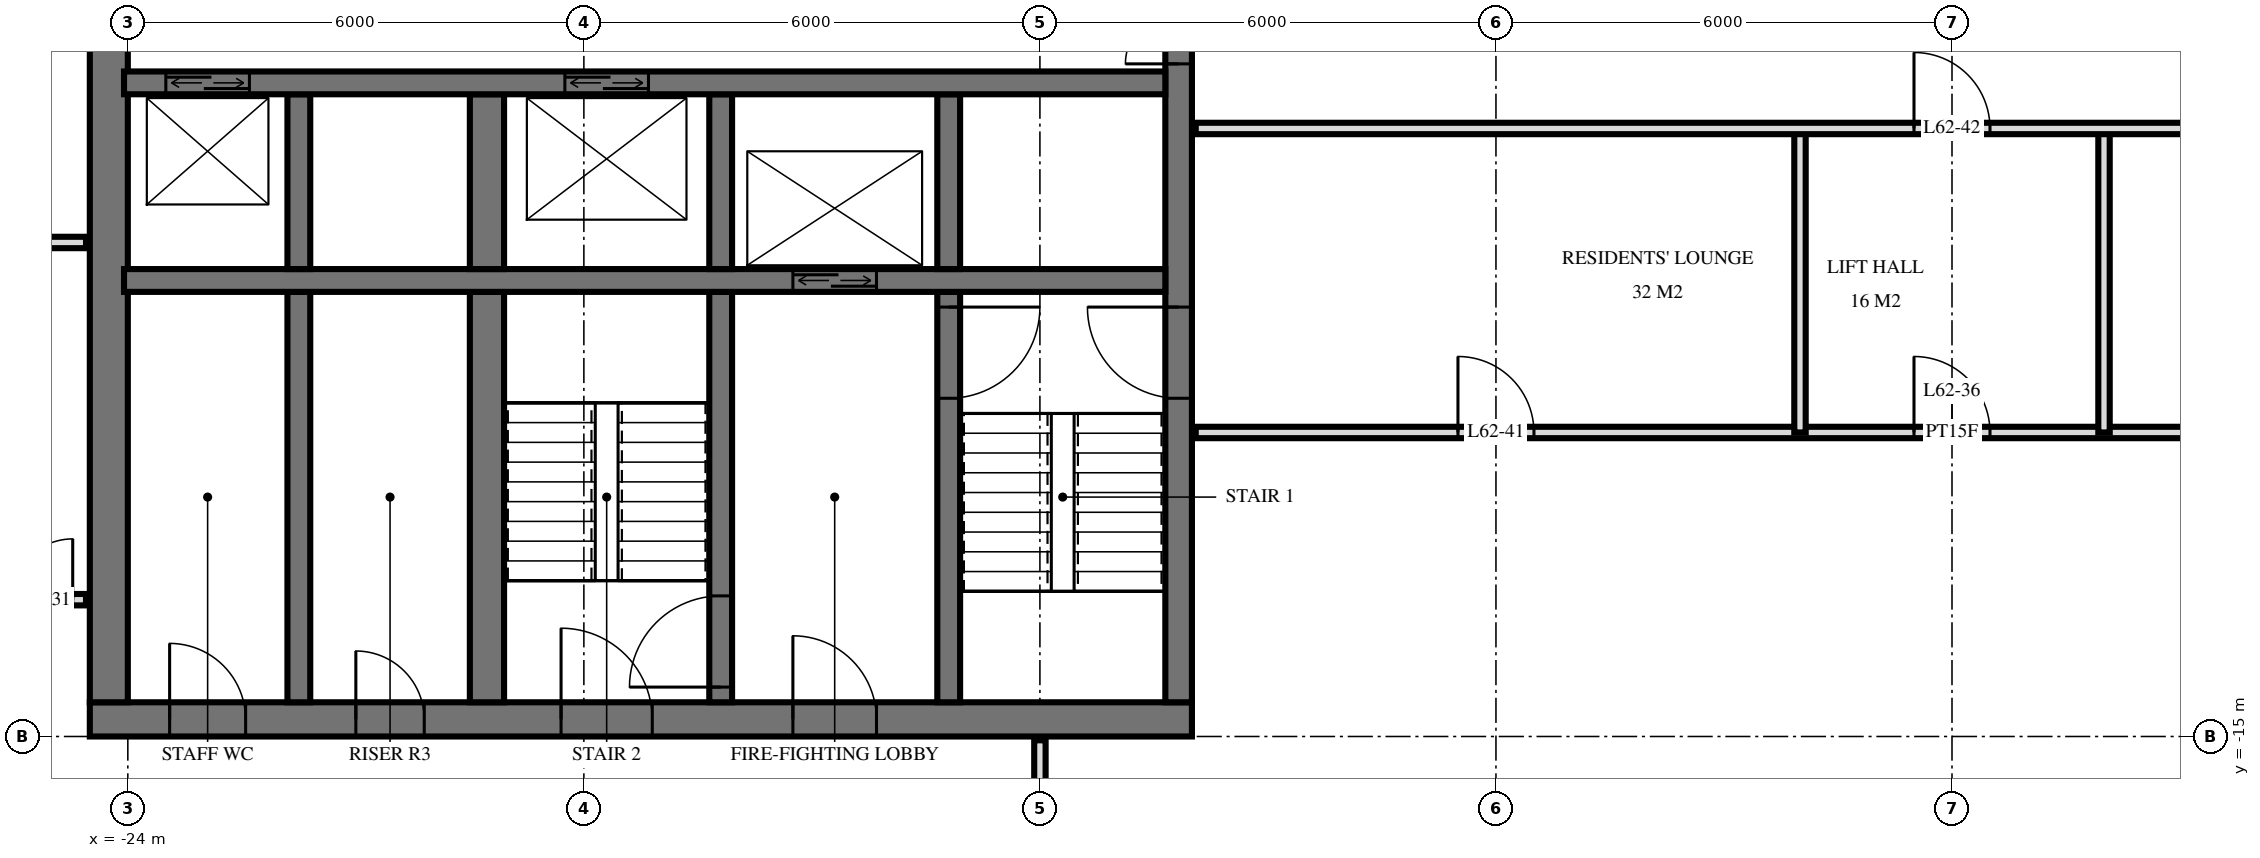
"""IFC4 building model, lengths in metres.
Left out: names, types, materials, properties, quantities, classifications, styles, units other than length and angle.
Written with IfcOpenShell. Run it as: python <this file> out.ifc"""

import sys

from ifc_helpers import new_model, si_unit, direction, frame, frame_2d, origin, place, context, subcontext, project, spatial, rectangle, extrude, element, fill, save


model = new_model("IFC4")
c1 = context("Model", 3, precision=1e-05, world=origin(), true_north=direction((0.0, 1.0)))
c2 = subcontext(c1, "Body", "Model", "MODEL_VIEW")
j1 = project(units=[si_unit("LENGTHUNIT", "METRE"), si_unit("PLANEANGLEUNIT", "RADIAN")], contexts=[c1])
p1 = place(None, origin())
s1 = spatial("IfcSite", under=j1, at=p1, CompositionType="ELEMENT")
p2 = place(p1, origin())
s2 = spatial("IfcBuilding", under=s1, at=p2, CompositionType="ELEMENT")
p3 = place(p2, frame((0.0, 0.0, 236.1)))
s3 = spatial("IfcBuildingStorey", under=s2, at=p3, CompositionType="ELEMENT", Elevation=236.1)
p4 = place(p3, frame((-24.5, -14.775, 0.0), z_axis=(0.0, 0.0, 1.0), x_axis=(1.0, 0.0, 0.0)))
e1 = element("IfcWall", 1, at=p4, inside=s3, PredefinedType="SHEAR", context=c2, shape_type="SweptSolid", body=[
    extrude(rectangle(XDim=14.5, YDim=0.45, at=frame_2d((7.25, 0.0))), origin(), (0.0, 0.0, 1.0), 3.5),
])
p5 = place(p4, frame((6.2, 0.0, 0.0)))
e2 = element("IfcOpeningElement", 2, at=p5, cuts=e1, PredefinedType="OPENING", context=c2, shape_type="SweptSolid", body=[
    extrude(rectangle(XDim=1.2, YDim=2.1, at=frame_2d((0.6, 1.05))), frame((0.0, 0.235, 0.0), z_axis=(0.0, -1.0, 0.0), x_axis=(1.0, 0.0, 0.0)), (0.0, 0.0, 1.0), 0.47),
])
p6 = place(p4, frame((9.25, 0.0, 0.0)))
e3 = element("IfcOpeningElement", 3, at=p6, cuts=e1, PredefinedType="OPENING", context=c2, shape_type="SweptSolid", body=[
    extrude(rectangle(XDim=1.1, YDim=2.1, at=frame_2d((0.55, 1.05))), frame((0.0, 0.235, 0.0), z_axis=(0.0, -1.0, 0.0), x_axis=(1.0, 0.0, 0.0)), (0.0, 0.0, 1.0), 0.47),
])
p7 = place(p4, frame((3.5, 0.0, 0.0)))
e4 = element("IfcOpeningElement", 4, at=p7, cuts=e1, PredefinedType="OPENING", context=c2, shape_type="SweptSolid", body=[
    extrude(rectangle(XDim=0.9, YDim=2.1, at=frame_2d((0.45, 1.05))), frame((0.0, 0.235, 0.0), z_axis=(0.0, -1.0, 0.0), x_axis=(1.0, 0.0, 0.0)), (0.0, 0.0, 1.0), 0.47),
])
p8 = place(p4, frame((1.05, 0.0, 0.0)))
e5 = element("IfcOpeningElement", 5, at=p8, cuts=e1, PredefinedType="OPENING", context=c2, shape_type="SweptSolid", body=[
    extrude(rectangle(XDim=1.0, YDim=2.1, at=frame_2d((0.5, 1.05))), frame((0.0, 0.235, 0.0), z_axis=(0.0, -1.0, 0.0), x_axis=(1.0, 0.0, 0.0)), (0.0, 0.0, 1.0), 0.47),
])
p9 = place(p3, frame((-10.175, -14.55, 0.0), z_axis=(0.0, 0.0, 1.0), x_axis=(0.0, 1.0, 0.0)))
e6 = element("IfcWall", 6, at=p9, inside=s3, PredefinedType="SHEAR", context=c2, shape_type="SweptSolid", body=[
    extrude(rectangle(XDim=14.1, YDim=0.35, at=frame_2d((7.05, 0.0))), origin(), (0.0, 0.0, 1.0), 3.5),
])
p10 = place(p9, frame((8.4, 0.0, 0.0)))
e7 = element("IfcOpeningElement", 7, at=p10, cuts=e6, PredefinedType="OPENING", context=c2, shape_type="SweptSolid", body=[
    extrude(rectangle(XDim=1.4, YDim=2.4, at=frame_2d((0.7, 1.2))), frame((0.0, 0.185, 0.0), z_axis=(0.0, -1.0, 0.0), x_axis=(1.0, 0.0, 0.0)), (0.0, 0.0, 1.0), 0.37),
])
p11 = place(p9, frame((10.0, 0.0, 0.0)))
e8 = element("IfcOpeningElement", 8, at=p11, cuts=e6, PredefinedType="OPENING", context=c2, shape_type="SweptSolid", body=[
    extrude(rectangle(XDim=1.4, YDim=2.4, at=frame_2d((0.7, 1.2))), frame((0.0, 0.185, 0.0), z_axis=(0.0, -1.0, 0.0), x_axis=(1.0, 0.0, 0.0)), (0.0, 0.0, 1.0), 0.37),
])
p12 = place(p9, frame((4.0, 0.0, 0.0)))
e9 = element("IfcOpeningElement", 9, at=p12, cuts=e6, PredefinedType="OPENING", context=c2, shape_type="SweptSolid", body=[
    extrude(rectangle(XDim=1.2, YDim=2.1, at=frame_2d((0.6, 1.05))), frame((0.0, 0.185, 0.0), z_axis=(0.0, -1.0, 0.0), x_axis=(1.0, 0.0, 0.0)), (0.0, 0.0, 1.0), 0.37),
])
p13 = place(p3, frame((-24.25, -14.55, 0.0), z_axis=(0.0, 0.0, 1.0), x_axis=(0.0, 1.0, 0.0)))
e10 = element("IfcWall", 10, at=p13, inside=s3, PredefinedType="SHEAR", context=c2, shape_type="SweptSolid", body=[
    extrude(rectangle(XDim=14.1, YDim=0.5, at=frame_2d((7.05, 0.0))), origin(), (0.0, 0.0, 1.0), 3.5),
])
p14 = place(p3, frame((-24.05, -6.4, 0.0), z_axis=(0.0, 0.0, 1.0), x_axis=(1.0, 0.0, 0.0)))
e11 = element("IfcWall", 11, at=p14, inside=s3, PredefinedType="SHEAR", context=c2, shape_type="SweptSolid", body=[
    extrude(rectangle(XDim=13.7, YDim=0.3, at=frame_2d((6.85, 0.0))), origin(), (0.0, 0.0, 1.0), 3.5),
])
p15 = place(p14, frame((0.55, 0.0, 0.0)))
e12 = element("IfcOpeningElement", 12, at=p15, cuts=e11, PredefinedType="OPENING", context=c2, shape_type="SweptSolid", body=[
    extrude(rectangle(XDim=1.1, YDim=2.1, at=frame_2d((0.55, 1.05))), frame((0.0, 0.16, 0.0), z_axis=(0.0, -1.0, 0.0), x_axis=(1.0, 0.0, 0.0)), (0.0, 0.0, 1.0), 0.32),
])
p16 = place(p14, frame((5.8, 0.0, 0.0)))
e13 = element("IfcOpeningElement", 13, at=p16, cuts=e11, PredefinedType="OPENING", context=c2, shape_type="SweptSolid", body=[
    extrude(rectangle(XDim=1.1, YDim=2.1, at=frame_2d((0.55, 1.05))), frame((0.0, 0.16, 0.0), z_axis=(0.0, -1.0, 0.0), x_axis=(1.0, 0.0, 0.0)), (0.0, 0.0, 1.0), 0.32),
])
p17 = place(p3, frame((-24.05, -9.0, 0.0), z_axis=(0.0, 0.0, 1.0), x_axis=(1.0, 0.0, 0.0)))
e14 = element("IfcWall", 14, at=p17, inside=s3, PredefinedType="SHEAR", context=c2, shape_type="SweptSolid", body=[
    extrude(rectangle(XDim=13.7, YDim=0.3, at=frame_2d((6.85, 0.0))), origin(), (0.0, 0.0, 1.0), 3.5),
])
p18 = place(p17, frame((8.8, 0.0, 0.0)))
e15 = element("IfcOpeningElement", 15, at=p18, cuts=e14, PredefinedType="OPENING", context=c2, shape_type="SweptSolid", body=[
    extrude(rectangle(XDim=1.1, YDim=2.1, at=frame_2d((0.55, 1.05))), frame((0.0, 0.16, 0.0), z_axis=(0.0, -1.0, 0.0), x_axis=(1.0, 0.0, 0.0)), (0.0, 0.0, 1.0), 0.32),
])
p19 = place(p3, frame((-13.2, -8.85, 0.0), z_axis=(0.0, 0.0, 1.0), x_axis=(0.0, 1.0, 0.0)))
e16 = element("IfcWall", 16, at=p19, inside=s3, PredefinedType="SHEAR", context=c2, shape_type="SweptSolid", body=[
    extrude(rectangle(XDim=2.3, YDim=0.3, at=frame_2d((1.15, 0.0))), origin(), (0.0, 0.0, 1.0), 3.5),
])
p20 = place(p3, frame((-13.2, -14.55, 0.0), z_axis=(0.0, 0.0, 1.0), x_axis=(0.0, 1.0, 0.0)))
e17 = element("IfcWall", 17, at=p20, inside=s3, PredefinedType="SHEAR", context=c2, shape_type="SweptSolid", body=[
    extrude(rectangle(XDim=5.4, YDim=0.3, at=frame_2d((2.7, 0.0))), origin(), (0.0, 0.0, 1.0), 3.5),
])
p21 = place(p20, frame((4.0, 0.0, 0.0)))
e18 = element("IfcOpeningElement", 18, at=p21, cuts=e17, PredefinedType="OPENING", context=c2, shape_type="SweptSolid", body=[
    extrude(rectangle(XDim=1.2, YDim=2.1, at=frame_2d((0.6, 1.05))), frame((0.0, 0.16, 0.0), z_axis=(0.0, -1.0, 0.0), x_axis=(1.0, 0.0, 0.0)), (0.0, 0.0, 1.0), 0.32),
])
p22 = place(p3, frame((-16.2, -8.85, 0.0), z_axis=(0.0, 0.0, 1.0), x_axis=(0.0, 1.0, 0.0)))
e19 = element("IfcWall", 19, at=p22, inside=s3, PredefinedType="SHEAR", context=c2, shape_type="SweptSolid", body=[
    extrude(rectangle(XDim=2.3, YDim=0.3, at=frame_2d((1.15, 0.0))), origin(), (0.0, 0.0, 1.0), 3.5),
])
p23 = place(p3, frame((-16.2, -14.55, 0.0), z_axis=(0.0, 0.0, 1.0), x_axis=(0.0, 1.0, 0.0)))
e20 = element("IfcWall", 20, at=p23, inside=s3, PredefinedType="SHEAR", context=c2, shape_type="SweptSolid", body=[
    extrude(rectangle(XDim=5.4, YDim=0.3, at=frame_2d((2.7, 0.0))), origin(), (0.0, 0.0, 1.0), 3.5),
])
p24 = place(p23, frame((0.2, 0.0, 0.0)))
e21 = element("IfcOpeningElement", 21, at=p24, cuts=e20, PredefinedType="OPENING", context=c2, shape_type="SweptSolid", body=[
    extrude(rectangle(XDim=1.2, YDim=2.1, at=frame_2d((0.6, 1.05))), frame((0.0, 0.16, 0.0), z_axis=(0.0, -1.0, 0.0), x_axis=(1.0, 0.0, 0.0)), (0.0, 0.0, 1.0), 0.32),
])
p25 = place(p3, frame((-19.275, -8.85, 0.0), z_axis=(0.0, 0.0, 1.0), x_axis=(0.0, 1.0, 0.0)))
e22 = element("IfcWall", 22, at=p25, inside=s3, PredefinedType="SHEAR", context=c2, shape_type="SweptSolid", body=[
    extrude(rectangle(XDim=2.3, YDim=0.45, at=frame_2d((1.15, 0.0))), origin(), (0.0, 0.0, 1.0), 3.5),
])
p26 = place(p3, frame((-19.275, -14.55, 0.0), z_axis=(0.0, 0.0, 1.0), x_axis=(0.0, 1.0, 0.0)))
e23 = element("IfcWall", 23, at=p26, inside=s3, PredefinedType="SHEAR", context=c2, shape_type="SweptSolid", body=[
    extrude(rectangle(XDim=5.4, YDim=0.45, at=frame_2d((2.7, 0.0))), origin(), (0.0, 0.0, 1.0), 3.5),
])
p27 = place(p3, frame((-21.75, -8.85, 0.0), z_axis=(0.0, 0.0, 1.0), x_axis=(0.0, 1.0, 0.0)))
e24 = element("IfcWall", 24, at=p27, inside=s3, PredefinedType="SHEAR", context=c2, shape_type="SweptSolid", body=[
    extrude(rectangle(XDim=2.3, YDim=0.3, at=frame_2d((1.15, 0.0))), origin(), (0.0, 0.0, 1.0), 3.5),
])
p28 = place(p3, frame((-21.75, -14.55, 0.0), z_axis=(0.0, 0.0, 1.0), x_axis=(0.0, 1.0, 0.0)))
e25 = element("IfcWall", 25, at=p28, inside=s3, PredefinedType="SHEAR", context=c2, shape_type="SweptSolid", body=[
    extrude(rectangle(XDim=5.4, YDim=0.3, at=frame_2d((2.7, 0.0))), origin(), (0.0, 0.0, 1.0), 3.5),
])
for number, where, z_axis, x_axis in (
    (26, (2.0, -11.0, 0.0), (0.0, 0.0, 1.0), (0.0, 1.0, 0.0)),
    (27, (-2.0, -11.0, 0.0), (0.0, 0.0, 1.0), (0.0, 1.0, 0.0)),
):
    element("IfcWall", number, at=place(p3, frame(where, z_axis=z_axis, x_axis=x_axis)), inside=s3, PredefinedType="PARTITIONING", context=c2, shape_type="SweptSolid", body=[
        extrude(rectangle(XDim=4.0, YDim=0.15, at=frame_2d((2.0, 0.0))), origin(), (0.0, 0.0, 1.0), 3.22),
    ])
p29 = place(p3, frame((-12.0, -17.4, 0.0), z_axis=(0.0, 0.0, 1.0), x_axis=(0.0, 1.0, 0.0)))
e28 = element("IfcWall", 28, at=p29, inside=s3, PredefinedType="PARTITIONING", context=c2, shape_type="SweptSolid", body=[
    extrude(rectangle(XDim=2.35, YDim=0.15, at=frame_2d((1.175, 0.0))), origin(), (0.0, 0.0, 1.0), 3.22),
])
p30 = place(p29, frame((0.7, 0.0, 0.0)))
e29 = element("IfcOpeningElement", 29, at=p30, cuts=e28, PredefinedType="OPENING", context=c2, shape_type="SweptSolid", body=[
    extrude(rectangle(XDim=1.0, YDim=2.1, at=frame_2d((0.5, 1.05))), frame((0.0, 0.085, 0.0), z_axis=(0.0, -1.0, 0.0), x_axis=(1.0, 0.0, 0.0)), (0.0, 0.0, 1.0), 0.17),
])
p31 = place(p3, frame((-25.7, -13.2, 0.0), z_axis=(0.0, 0.0, 1.0), x_axis=(1.0, 0.0, 0.0)))
e30 = element("IfcWall", 30, at=p31, inside=s3, PredefinedType="PARTITIONING", context=c2, shape_type="SweptSolid", body=[
    extrude(rectangle(XDim=1.15, YDim=0.15, at=frame_2d((0.575, 0.0))), origin(), (0.0, 0.0, 1.0), 3.22),
])
p32 = place(p31, frame((0.175, 0.0, 0.0)))
e31 = element("IfcOpeningElement", 31, at=p32, cuts=e30, PredefinedType="OPENING", context=c2, shape_type="SweptSolid", body=[
    extrude(rectangle(XDim=0.8, YDim=2.1, at=frame_2d((0.4, 1.05))), frame((0.0, 0.085, 0.0), z_axis=(0.0, -1.0, 0.0), x_axis=(1.0, 0.0, 0.0)), (0.0, 0.0, 1.0), 0.17),
])
p33 = place(p3, frame((-9.95, -11.0, 0.0), z_axis=(0.0, 0.0, 1.0), x_axis=(1.0, 0.0, 0.0)))
e32 = element("IfcWall", 32, at=p33, inside=s3, PredefinedType="PARTITIONING", context=c2, shape_type="SweptSolid", body=[
    extrude(rectangle(XDim=19.9, YDim=0.15, at=frame_2d((9.95, 0.0))), origin(), (0.0, 0.0, 1.0), 3.22),
])
p34 = place(p33, frame((9.45, 0.0, 0.0)))
e33 = element("IfcOpeningElement", 33, at=p34, cuts=e32, PredefinedType="OPENING", context=c2, shape_type="SweptSolid", body=[
    extrude(rectangle(XDim=1.0, YDim=2.1, at=frame_2d((0.5, 1.05))), frame((0.0, 0.085, 0.0), z_axis=(0.0, -1.0, 0.0), x_axis=(1.0, 0.0, 0.0)), (0.0, 0.0, 1.0), 0.17),
])
p35 = place(p33, frame((3.45, 0.0, 0.0)))
e34 = element("IfcOpeningElement", 34, at=p35, cuts=e32, PredefinedType="OPENING", context=c2, shape_type="SweptSolid", body=[
    extrude(rectangle(XDim=1.0, YDim=2.1, at=frame_2d((0.5, 1.05))), frame((0.0, 0.085, 0.0), z_axis=(0.0, -1.0, 0.0), x_axis=(1.0, 0.0, 0.0)), (0.0, 0.0, 1.0), 0.17),
])
p36 = place(p3, frame((-26.82, -8.5, 0.0), z_axis=(0.0, 0.0, 1.0), x_axis=(1.0, 0.0, 0.0)))
e35 = element("IfcWall", 35, at=p36, inside=s3, PredefinedType="PARTITIONING", context=c2, shape_type="SweptSolid", body=[
    extrude(rectangle(XDim=2.27, YDim=0.15, at=frame_2d((1.135, 0.0))), origin(), (0.0, 0.0, 1.0), 3.22),
])
p37 = place(p36, frame((0.62, 0.0, 0.0)))
e36 = element("IfcOpeningElement", 36, at=p37, cuts=e35, PredefinedType="OPENING", context=c2, shape_type="SweptSolid", body=[
    extrude(rectangle(XDim=0.9, YDim=2.1, at=frame_2d((0.45, 1.05))), frame((0.0, 0.085, 0.0), z_axis=(0.0, -1.0, 0.0), x_axis=(1.0, 0.0, 0.0)), (0.0, 0.0, 1.0), 0.17),
])
p38 = place(p3, frame((-9.95, -7.0, 0.0), z_axis=(0.0, 0.0, 1.0), x_axis=(1.0, 0.0, 0.0)))
e37 = element("IfcWall", 37, at=p38, inside=s3, PredefinedType="PARTITIONING", context=c2, shape_type="SweptSolid", body=[
    extrude(rectangle(XDim=19.9, YDim=0.15, at=frame_2d((9.95, 0.0))), origin(), (0.0, 0.0, 1.0), 3.22),
])
p39 = place(p38, frame((9.45, 0.0, 0.0)))
e38 = element("IfcOpeningElement", 38, at=p39, cuts=e37, PredefinedType="OPENING", context=c2, shape_type="SweptSolid", body=[
    extrude(rectangle(XDim=1.0, YDim=2.1, at=frame_2d((0.5, 1.05))), frame((0.0, 0.085, 0.0), z_axis=(0.0, -1.0, 0.0), x_axis=(1.0, 0.0, 0.0)), (0.0, 0.0, 1.0), 0.17),
])
p40 = place(p38, frame((15.45, 0.0, 0.0)))
e39 = element("IfcOpeningElement", 39, at=p40, cuts=e37, PredefinedType="OPENING", context=c2, shape_type="SweptSolid", body=[
    extrude(rectangle(XDim=1.0, YDim=2.1, at=frame_2d((0.5, 1.05))), frame((0.0, 0.085, 0.0), z_axis=(0.0, -1.0, 0.0), x_axis=(1.0, 0.0, 0.0)), (0.0, 0.0, 1.0), 0.17),
])
p41 = place(p15, origin())
e40 = element("IfcDoor", 40, at=p41, inside=s3, OperationType="DOUBLE_DOOR_SLIDING", PredefinedType="USERDEFINED", context=c2, shape_type="SweptSolid", body=[
    extrude(rectangle(XDim=1.1, YDim=2.1, at=frame_2d((0.55, 1.05))), frame((0.0, 0.025, 0.0), z_axis=(0.0, -1.0, 0.0), x_axis=(1.0, 0.0, 0.0)), (0.0, 0.0, 1.0), 0.05),
])
fill(e12, e40)
p42 = place(p18, origin())
e41 = element("IfcDoor", 41, at=p42, inside=s3, OperationType="DOUBLE_DOOR_SLIDING", PredefinedType="USERDEFINED", context=c2, shape_type="SweptSolid", body=[
    extrude(rectangle(XDim=1.1, YDim=2.1, at=frame_2d((0.55, 1.05))), frame((0.0, 0.025, 0.0), z_axis=(0.0, -1.0, 0.0), x_axis=(1.0, 0.0, 0.0)), (0.0, 0.0, 1.0), 0.05),
])
fill(e15, e41)
p43 = place(p16, origin())
e42 = element("IfcDoor", 42, at=p43, inside=s3, OperationType="DOUBLE_DOOR_SLIDING", PredefinedType="USERDEFINED", context=c2, shape_type="SweptSolid", body=[
    extrude(rectangle(XDim=1.1, YDim=2.1, at=frame_2d((0.55, 1.05))), frame((0.0, 0.025, 0.0), z_axis=(0.0, -1.0, 0.0), x_axis=(1.0, 0.0, 0.0)), (0.0, 0.0, 1.0), 0.05),
])
fill(e13, e42)
p44 = place(p10, origin())
e43 = element("IfcDoor", 43, at=p44, inside=s3, OperationType="DOUBLE_DOOR_SINGLE_SWING", PredefinedType="DOOR", context=c2, shape_type="SweptSolid", body=[
    extrude(rectangle(XDim=1.4, YDim=2.4, at=frame_2d((0.7, 1.2))), frame((0.0, 0.025, 0.0), z_axis=(0.0, -1.0, 0.0), x_axis=(1.0, 0.0, 0.0)), (0.0, 0.0, 1.0), 0.05),
])
fill(e7, e43)
p45 = place(p12, origin())
e44 = element("IfcDoor", 44, at=p45, inside=s3, OperationType="SINGLE_SWING_LEFT", PredefinedType="DOOR", context=c2, shape_type="SweptSolid", body=[
    extrude(rectangle(XDim=1.2, YDim=2.1, at=frame_2d((0.6, 1.05))), frame((0.0, 0.025, 0.0), z_axis=(0.0, -1.0, 0.0), x_axis=(1.0, 0.0, 0.0)), (0.0, 0.0, 1.0), 0.05),
])
fill(e9, e44)
p46 = place(p5, origin())
e45 = element("IfcDoor", 45, at=p46, inside=s3, OperationType="SINGLE_SWING_RIGHT", PredefinedType="DOOR", context=c2, shape_type="SweptSolid", body=[
    extrude(rectangle(XDim=1.2, YDim=2.1, at=frame_2d((0.6, 1.05))), frame((0.0, 0.025, 0.0), z_axis=(0.0, -1.0, 0.0), x_axis=(1.0, 0.0, 0.0)), (0.0, 0.0, 1.0), 0.05),
])
fill(e2, e45)
p47 = place(p6, origin())
e46 = element("IfcDoor", 46, at=p47, inside=s3, OperationType="SINGLE_SWING_RIGHT", PredefinedType="DOOR", context=c2, shape_type="SweptSolid", body=[
    extrude(rectangle(XDim=1.1, YDim=2.1, at=frame_2d((0.55, 1.05))), frame((0.0, 0.025, 0.0), z_axis=(0.0, -1.0, 0.0), x_axis=(1.0, 0.0, 0.0)), (0.0, 0.0, 1.0), 0.05),
])
fill(e3, e46)
p48 = place(p7, origin())
e47 = element("IfcDoor", 47, at=p48, inside=s3, OperationType="SINGLE_SWING_RIGHT", PredefinedType="DOOR", context=c2, shape_type="SweptSolid", body=[
    extrude(rectangle(XDim=0.9, YDim=2.1, at=frame_2d((0.45, 1.05))), frame((0.0, 0.025, 0.0), z_axis=(0.0, -1.0, 0.0), x_axis=(1.0, 0.0, 0.0)), (0.0, 0.0, 1.0), 0.05),
])
fill(e4, e47)
p49 = place(p8, origin())
e48 = element("IfcDoor", 48, at=p49, inside=s3, OperationType="SINGLE_SWING_RIGHT", PredefinedType="DOOR", context=c2, shape_type="SweptSolid", body=[
    extrude(rectangle(XDim=1.0, YDim=2.1, at=frame_2d((0.5, 1.05))), frame((0.0, 0.025, 0.0), z_axis=(0.0, -1.0, 0.0), x_axis=(1.0, 0.0, 0.0)), (0.0, 0.0, 1.0), 0.05),
])
fill(e5, e48)
p50 = place(p21, frame((0.6, 0.0, 0.0), z_axis=(0.0, 0.0, 1.0), x_axis=(-1.0, 0.0, 0.0)))
e49 = element("IfcDoor", 49, at=p50, inside=s3, OperationType="SINGLE_SWING_RIGHT", PredefinedType="DOOR", context=c2, shape_type="SweptSolid", body=[
    extrude(rectangle(XDim=1.2, YDim=2.1, at=frame_2d((0.0, 1.05))), frame((0.0, -0.025, 0.0), z_axis=(0.0, 1.0, 0.0), x_axis=(-1.0, 0.0, 0.0)), (0.0, 0.0, 1.0), 0.05),
])
fill(e18, e49)
p51 = place(p24, origin())
e50 = element("IfcDoor", 50, at=p51, inside=s3, OperationType="SINGLE_SWING_RIGHT", PredefinedType="DOOR", context=c2, shape_type="SweptSolid", body=[
    extrude(rectangle(XDim=1.2, YDim=2.1, at=frame_2d((0.6, 1.05))), frame((0.0, 0.025, 0.0), z_axis=(0.0, -1.0, 0.0), x_axis=(1.0, 0.0, 0.0)), (0.0, 0.0, 1.0), 0.05),
])
fill(e21, e50)
p52 = place(p32, origin())
e51 = element("IfcDoor", 51, at=p52, inside=s3, OperationType="SINGLE_SWING_LEFT", PredefinedType="DOOR", context=c2, shape_type="SweptSolid", body=[
    extrude(rectangle(XDim=0.8, YDim=2.1, at=frame_2d((0.4, 1.05))), frame((0.0, 0.025, 0.0), z_axis=(0.0, -1.0, 0.0), x_axis=(1.0, 0.0, 0.0)), (0.0, 0.0, 1.0), 0.05),
])
fill(e31, e51)
p53 = place(p34, origin())
e52 = element("IfcDoor", 52, at=p53, inside=s3, OperationType="SINGLE_SWING_RIGHT", PredefinedType="DOOR", context=c2, shape_type="SweptSolid", body=[
    extrude(rectangle(XDim=1.0, YDim=2.1, at=frame_2d((0.5, 1.05))), frame((0.0, 0.025, 0.0), z_axis=(0.0, -1.0, 0.0), x_axis=(1.0, 0.0, 0.0)), (0.0, 0.0, 1.0), 0.05),
])
fill(e33, e52)
p54 = place(p35, origin())
e53 = element("IfcDoor", 53, at=p54, inside=s3, OperationType="SINGLE_SWING_RIGHT", PredefinedType="DOOR", context=c2, shape_type="SweptSolid", body=[
    extrude(rectangle(XDim=1.0, YDim=2.1, at=frame_2d((0.5, 1.05))), frame((0.0, 0.025, 0.0), z_axis=(0.0, -1.0, 0.0), x_axis=(1.0, 0.0, 0.0)), (0.0, 0.0, 1.0), 0.05),
])
fill(e34, e53)
p55 = place(p39, origin())
e54 = element("IfcDoor", 54, at=p55, inside=s3, OperationType="SINGLE_SWING_RIGHT", PredefinedType="DOOR", context=c2, shape_type="SweptSolid", body=[
    extrude(rectangle(XDim=1.0, YDim=2.1, at=frame_2d((0.5, 1.05))), frame((0.0, 0.025, 0.0), z_axis=(0.0, -1.0, 0.0), x_axis=(1.0, 0.0, 0.0)), (0.0, 0.0, 1.0), 0.05),
])
fill(e38, e54)
save(model, sys.argv[1])
